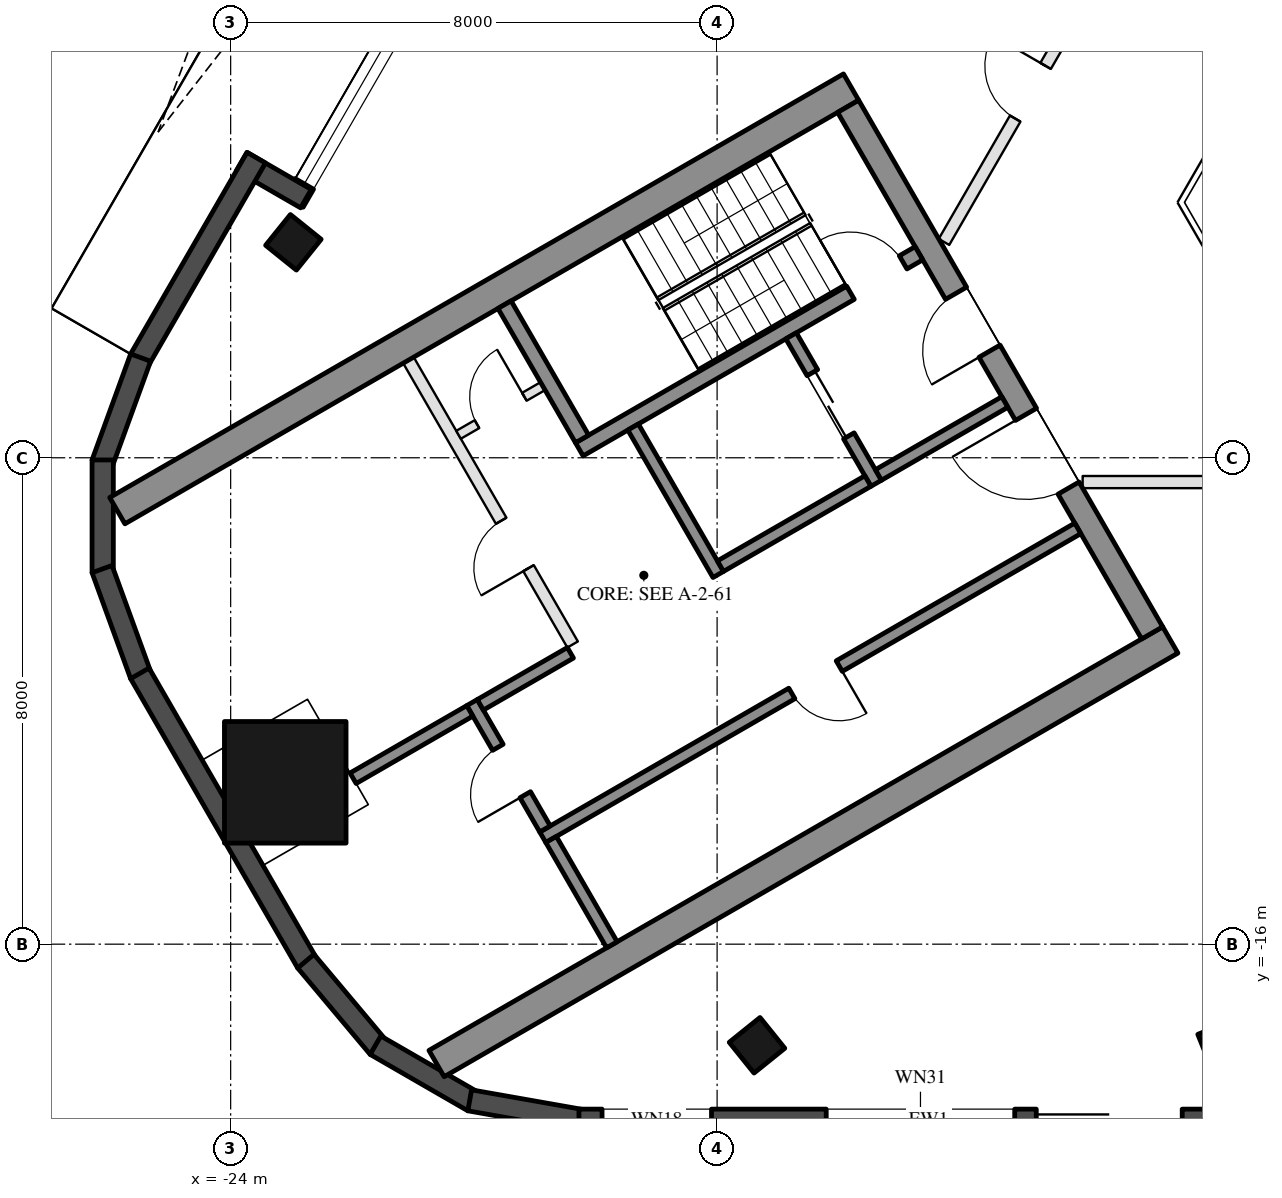
"""IFC4 building model, lengths in metres.
Left out: names, types, materials, properties, quantities, classifications, styles, units other than length and angle.
Written with IfcOpenShell. Run it as: python <this file> out.ifc"""

import sys

from ifc_helpers import new_model, si_unit, direction, frame, frame_2d, origin, origin_2d, place, context, subcontext, project, spatial, rectangle, hollow_rectangle, extrude, boolean, halfspace, element, fill, save


model = new_model("IFC4")
c1 = context("Model", 3, precision=1e-05, world=origin(), true_north=direction((0.0, 1.0)))
c2 = subcontext(c1, "Body", "Model", "MODEL_VIEW")
j1 = project(units=[si_unit("LENGTHUNIT", "METRE"), si_unit("PLANEANGLEUNIT", "RADIAN")], contexts=[c1])
p1 = place(None, origin())
s1 = spatial("IfcSite", under=j1, at=p1, CompositionType="ELEMENT")
p2 = place(p1, origin())
s2 = spatial("IfcBuilding", under=s1, at=p2, CompositionType="ELEMENT")
p3 = place(p2, frame((0.0, 0.0, 265.2)))
s3 = spatial("IfcBuildingStorey", under=s2, at=p3, CompositionType="ELEMENT", Elevation=265.2)
p4 = place(p3, frame((-15.344, -17.663, 0.0), z_axis=(0.121006106938, 0.150399778714, 0.981191840899), x_axis=(-0.992606962496, 0.008942251163, 0.121043191254)))
e1 = element("IfcColumn", 1, at=p4, inside=s3, PredefinedType="COLUMN", context=c2, shape_type="SweptSolid", body=[
    boolean("DIFFERENCE", boolean("DIFFERENCE", extrude(hollow_rectangle(XDim=0.65, YDim=0.65, WallThickness=0.03, at=origin_2d()), origin(), (0.0, 0.0, 1.0), 3.771), halfspace(frame((0.0, 0.0, 0.047), z_axis=(0.0, 0.0, 1.0), x_axis=(1.0, 0.0, 0.0)), True)), halfspace(frame((0.0, 0.0, 3.724), z_axis=(0.0, 0.0, 1.0), x_axis=(1.0, 0.0, 0.0)), False)),
])
p5 = place(p3, frame((-22.968, -4.457, 0.0), z_axis=(0.190735471498, 0.029652697198, 0.981193506634), x_axis=(-0.488320350716, -0.86422901804, 0.121043130549)))
e2 = element("IfcColumn", 2, at=p5, inside=s3, PredefinedType="COLUMN", context=c2, shape_type="SweptSolid", body=[
    boolean("DIFFERENCE", boolean("DIFFERENCE", extrude(hollow_rectangle(XDim=0.65, YDim=0.65, WallThickness=0.03, at=origin_2d()), origin(), (0.0, 0.0, 1.0), 3.771), halfspace(frame((0.0, 0.0, 0.047), z_axis=(0.0, 0.0, 1.0), x_axis=(1.0, 0.0, 0.0)), True)), halfspace(frame((0.0, 0.0, 3.724), z_axis=(0.0, 0.0, 1.0), x_axis=(1.0, 0.0, 0.0)), False)),
])
p6 = place(p3, frame((-23.102, -13.338, 0.0), z_axis=(0.190346159062, 0.109881938965, 0.975548204457), x_axis=(-0.499994868029, 0.866028366632, 1.1507946e-05)))
e3 = element("IfcColumn", 3, at=p6, inside=s3, PredefinedType="COLUMN", context=c2, shape_type="SweptSolid", body=[
    boolean("DIFFERENCE", boolean("DIFFERENCE", extrude(hollow_rectangle(XDim=2.0, YDim=2.0, WallThickness=0.05, at=origin_2d()), origin(), (0.0, 0.0, 1.0), 3.793), halfspace(frame((0.0, 0.0, 0.113), z_axis=(0.0, 0.0, 1.0), x_axis=(1.0, 0.0, 0.0)), True)), halfspace(frame((0.0, 0.0, 3.679), z_axis=(0.0, 0.0, 1.0), x_axis=(1.0, 0.0, 0.0)), False)),
])
p7 = place(p3, frame((-19.704, 1.848, 0.0), z_axis=(0.0, 0.0, 1.0), x_axis=(-0.499993986225, -0.866028875811, 0.0)))
e4 = element("IfcWall", 4, at=p7, inside=s3, PredefinedType="SOLIDWALL", context=c2, shape_type="SweptSolid", body=[
    extrude(rectangle(XDim=6.512, YDim=0.35, at=frame_2d((3.256, 0.0))), origin(), (0.0, 0.0, 1.0), 3.55),
])
p8 = place(p7, frame((0.77, 0.0, 0.0)))
e5 = element("IfcOpeningElement", 5, at=p8, cuts=e4, PredefinedType="OPENING", context=c2, shape_type="SweptSolid", body=[
    extrude(rectangle(XDim=2.4, YDim=2.4, at=frame_2d((1.2, 1.2))), frame((0.0, 0.185, 0.0), z_axis=(0.0, -1.0, 0.0), x_axis=(1.0, 0.0, 0.0)), (0.0, 0.0, 1.0), 0.37),
])
p9 = place(p7, frame((3.47, 0.0, 0.3)))
e6 = element("IfcOpeningElement", 6, at=p9, cuts=e4, PredefinedType="OPENING", context=c2, shape_type="SweptSolid", body=[
    extrude(rectangle(XDim=2.7, YDim=2.65, at=frame_2d((1.35, 1.325))), frame((0.0, 0.185, 0.0), z_axis=(0.0, -1.0, 0.0), x_axis=(1.0, 0.0, 0.0)), (0.0, 0.0, 1.0), 0.37),
])
p10 = place(p3, frame((-22.762, -3.739, 0.0), z_axis=(0.0, 0.0, 1.0), x_axis=(-0.866042269935, 0.499970785833, 0.0)))
e7 = element("IfcWall", 7, at=p10, inside=s3, PredefinedType="SOLIDWALL", context=c2, shape_type="SweptSolid", body=[
    extrude(rectangle(XDim=1.22, YDim=0.35, at=frame_2d((0.61, 0.0))), origin(), (0.0, 0.0, 1.0), 3.55),
])
p11 = place(p3, frame((-23.579, -3.065, 0.0), z_axis=(0.0, 0.0, 1.0), x_axis=(-0.500048109927, -0.865997625723, 0.0)))
e8 = element("IfcWall", 8, at=p11, inside=s3, PredefinedType="SOLIDWALL", context=c2, shape_type="SweptSolid", body=[
    extrude(rectangle(XDim=3.829, YDim=0.35, at=frame_2d((1.914, 0.0))), origin(), (0.0, 0.0, 1.0), 3.55),
])
for number, where, z_axis, x_axis in (
    (9, (-25.481, -6.353, 0.0), (0.0, 0.0, 1.0), (-0.342, -0.94, 0.0)),
    (10, (-26.104, -8.036, 0.0), (0.0, 0.0, 1.0), (0.0, -1.0, 0.0)),
):
    element("IfcWall", number, at=place(p3, frame(where, z_axis=z_axis, x_axis=x_axis)), inside=s3, PredefinedType="SOLIDWALL", context=c2, shape_type="SweptSolid", body=[
        extrude(rectangle(XDim=1.855, YDim=0.35, at=frame_2d((0.927, 0.0))), origin(), (0.0, 0.0, 1.0), 3.55),
    ])
p12 = place(p3, frame((-26.115, -9.831, 0.0), z_axis=(0.0, 0.0, 1.0), x_axis=(0.341890986265, -0.93973962006, 0.0)))
e11 = element("IfcWall", 11, at=p12, inside=s3, PredefinedType="SOLIDWALL", context=c2, shape_type="SweptSolid", body=[
    extrude(rectangle(XDim=1.855, YDim=0.35, at=frame_2d((0.928, 0.0))), origin(), (0.0, 0.0, 1.0), 3.55),
])
p13 = place(p3, frame((-25.494, -11.546, 0.0), z_axis=(0.0, 0.0, 1.0), x_axis=(0.500028854569, -0.86600874395, 0.0)))
e12 = element("IfcWall", 12, at=p13, inside=s3, PredefinedType="SOLIDWALL", context=c2, shape_type="SweptSolid", body=[
    extrude(rectangle(XDim=5.495, YDim=0.35, at=frame_2d((2.748, 0.0))), origin(), (0.0, 0.0, 1.0), 3.55),
])
for number, where, z_axis, x_axis in (
    (13, (-22.764, -16.28, 0.0), (0.0, 0.0, 1.0), (0.643, -0.766, 0.0)),
    (14, (-21.618, -17.662, 0.0), (0.0, 0.0, 1.0), (0.866, -0.5, 0.0)),
):
    element("IfcWall", number, at=place(p3, frame(where, z_axis=z_axis, x_axis=x_axis)), inside=s3, PredefinedType="SOLIDWALL", context=c2, shape_type="SweptSolid", body=[
        extrude(rectangle(XDim=1.855, YDim=0.35, at=frame_2d((0.927, 0.0))), origin(), (0.0, 0.0, 1.0), 3.55),
    ])
p14 = place(p3, frame((-20.069, -18.568, 0.0), z_axis=(0.0, 0.0, 1.0), x_axis=(0.984791508075, -0.173740282098, 0.0)))
e15 = element("IfcWall", 15, at=p14, inside=s3, PredefinedType="SOLIDWALL", context=c2, shape_type="SweptSolid", body=[
    extrude(rectangle(XDim=1.855, YDim=0.35, at=frame_2d((0.927, 0.0))), origin(), (0.0, 0.0, 1.0), 3.55),
])
p15 = place(p3, frame((-18.272, -18.888, 0.0), z_axis=(0.0, 0.0, 1.0), x_axis=(1.0, 0.0, 0.0)))
e16 = element("IfcWall", 16, at=p15, inside=s3, PredefinedType="SOLIDWALL", context=c2, shape_type="SweptSolid", body=[
    extrude(rectangle(XDim=11.5, YDim=0.35, at=frame_2d((5.75, 0.0))), origin(), (0.0, 0.0, 1.0), 3.55),
])
p16 = place(p15, frame((0.38, 0.0, 0.3)))
e17 = element("IfcOpeningElement", 17, at=p16, cuts=e16, PredefinedType="OPENING", context=c2, shape_type="SweptSolid", body=[
    extrude(rectangle(XDim=1.8, YDim=2.65, at=frame_2d((0.9, 1.325))), frame((0.0, 0.185, 0.0), z_axis=(0.0, -1.0, 0.0), x_axis=(1.0, 0.0, 0.0)), (0.0, 0.0, 1.0), 0.37),
])
p17 = place(p15, frame((7.521, 0.0, 0.0)))
e18 = element("IfcOpeningElement", 18, at=p17, cuts=e16, PredefinedType="OPENING", context=c2, shape_type="SweptSolid", body=[
    extrude(rectangle(XDim=2.4, YDim=2.4, at=frame_2d((1.2, 1.2))), frame((0.0, 0.185, 0.0), z_axis=(0.0, -1.0, 0.0), x_axis=(1.0, 0.0, 0.0)), (0.0, 0.0, 1.0), 0.37),
])
p18 = place(p15, frame((4.067, 0.0, 0.3)))
e19 = element("IfcOpeningElement", 19, at=p18, cuts=e16, PredefinedType="OPENING", context=c2, shape_type="SweptSolid", body=[
    extrude(rectangle(XDim=3.1, YDim=2.65, at=frame_2d((1.55, 1.325))), frame((0.0, 0.185, 0.0), z_axis=(0.0, -1.0, 0.0), x_axis=(1.0, 0.0, 0.0)), (0.0, 0.0, 1.0), 0.37),
])
for number, where, z_axis, x_axis in (
    (20, (-13.797, -1.903, 0.0), (0.0, 0.0, 1.0), (-0.866, -0.5, 0.0)),
    (21, (-8.547, -10.997, 0.0), (0.0, 0.0, 1.0), (-0.866, -0.5, 0.0)),
):
    element("IfcWall", number, at=place(p3, frame(where, z_axis=z_axis, x_axis=x_axis)), inside=s3, PredefinedType="SHEAR", context=c2, shape_type="SweptSolid", body=[
        extrude(rectangle(XDim=13.934, YDim=0.5, at=frame_2d((6.967, 0.0))), origin(), (0.0, 0.0, 1.0), 3.5),
    ])
p19 = place(p3, frame((-13.845, -2.22, 0.0), z_axis=(0.0, 0.0, 1.0), x_axis=(0.500004234368, -0.866022959057, 0.0)))
e22 = element("IfcWall", 22, at=p19, inside=s3, PredefinedType="SHEAR", context=c2, shape_type="SweptSolid", body=[
    extrude(rectangle(XDim=10.0, YDim=0.4, at=frame_2d((5.0, 0.0))), origin(), (0.0, 0.0, 1.0), 3.5),
])
p20 = place(p19, frame((3.55, 0.0, 0.0)))
e23 = element("IfcOpeningElement", 23, at=p20, cuts=e22, PredefinedType="OPENING", context=c2, shape_type="SweptSolid", body=[
    extrude(rectangle(XDim=1.1, YDim=2.1, at=frame_2d((0.55, 1.05))), frame((0.0, 0.21, 0.0), z_axis=(0.0, -1.0, 0.0), x_axis=(1.0, 0.0, 0.0)), (0.0, 0.0, 1.0), 0.42),
])
p21 = place(p19, frame((5.85, 0.0, 0.0)))
e24 = element("IfcOpeningElement", 24, at=p21, cuts=e22, PredefinedType="OPENING", context=c2, shape_type="SweptSolid", body=[
    extrude(rectangle(XDim=1.4, YDim=2.1, at=frame_2d((0.7, 1.05))), frame((0.0, 0.21, 0.0), z_axis=(0.0, -1.0, 0.0), x_axis=(1.0, 0.0, 0.0)), (0.0, 0.0, 1.0), 0.42),
])
p22 = place(p3, frame((-12.681, -4.636, 0.0), z_axis=(0.0, 0.0, 1.0), x_axis=(-0.866021702275, -0.500006411147, 0.0)))
e25 = element("IfcWall", 25, at=p22, inside=s3, PredefinedType="SHEAR", context=c2, shape_type="SweptSolid", body=[
    extrude(rectangle(XDim=6.45, YDim=0.25, at=frame_2d((3.225, 0.0))), origin(), (0.0, 0.0, 1.0), 3.5),
])
p23 = place(p22, frame((0.3, 0.0, 0.0)))
e26 = element("IfcOpeningElement", 26, at=p23, cuts=e25, PredefinedType="OPENING", context=c2, shape_type="SweptSolid", body=[
    extrude(rectangle(XDim=1.0, YDim=2.1, at=frame_2d((0.5, 1.05))), frame((0.0, 0.135, 0.0), z_axis=(0.0, -1.0, 0.0), x_axis=(1.0, 0.0, 0.0)), (0.0, 0.0, 1.0), 0.27),
])
p24 = place(p3, frame((-19.496, -5.482, 0.0), z_axis=(0.0, 0.0, 1.0), x_axis=(0.499990435942, -0.866030925526, 0.0)))
e27 = element("IfcWall", 27, at=p24, inside=s3, PredefinedType="SHEAR", context=c2, shape_type="SweptSolid", body=[
    extrude(rectangle(XDim=2.55, YDim=0.25, at=frame_2d((1.275, 0.0))), origin(), (0.0, 0.0, 1.0), 3.5),
])
p25 = place(p3, frame((-17.381, -7.495, 0.0), z_axis=(0.0, 0.0, 1.0), x_axis=(0.500011755427, -0.866018616679, 0.0)))
e28 = element("IfcWall", 28, at=p25, inside=s3, PredefinedType="SHEAR", context=c2, shape_type="SweptSolid", body=[
    extrude(rectangle(XDim=2.8, YDim=0.2, at=frame_2d((1.4, 0.0))), origin(), (0.0, 0.0, 1.0), 3.5),
])
p26 = place(p3, frame((-14.783, -5.995, 0.0), z_axis=(0.0, 0.0, 1.0), x_axis=(0.49994636267, -0.866056369097, 0.0)))
e29 = element("IfcWall", 29, at=p26, inside=s3, PredefinedType="SHEAR", context=c2, shape_type="SweptSolid", body=[
    extrude(rectangle(XDim=2.8, YDim=0.2, at=frame_2d((1.4, 0.0))), origin(), (0.0, 0.0, 1.0), 3.5),
])
p27 = place(p26, frame((0.7, 0.0, 0.0)))
e30 = element("IfcOpeningElement", 30, at=p27, cuts=e29, PredefinedType="OPENING", context=c2, shape_type="SweptSolid", body=[
    extrude(rectangle(XDim=1.2, YDim=2.1, at=frame_2d((0.6, 1.05))), frame((0.0, 0.11, 0.0), z_axis=(0.0, -1.0, 0.0), x_axis=(1.0, 0.0, 0.0)), (0.0, 0.0, 1.0), 0.22),
])
p28 = place(p3, frame((-13.52, -8.383, 0.0), z_axis=(0.0, 0.0, 1.0), x_axis=(-0.866034573852, -0.49998411664, 0.0)))
e31 = element("IfcWall", 31, at=p28, inside=s3, PredefinedType="SHEAR", context=c2, shape_type="SweptSolid", body=[
    extrude(rectangle(XDim=2.8, YDim=0.2, at=frame_2d((1.4, 0.0))), origin(), (0.0, 0.0, 1.0), 3.5),
])
p29 = place(p3, frame((-11.268, -7.083, 0.0), z_axis=(0.0, 0.0, 1.0), x_axis=(-0.866050077142, -0.499957262057, 0.0)))
e32 = element("IfcWall", 32, at=p29, inside=s3, PredefinedType="SHEAR", context=c2, shape_type="SweptSolid", body=[
    extrude(rectangle(XDim=2.4, YDim=0.2, at=frame_2d((1.2, 0.0))), origin(), (0.0, 0.0, 1.0), 3.5),
])
p30 = place(p3, frame((-10.068, -9.162, 0.0), z_axis=(0.0, 0.0, 1.0), x_axis=(-0.866032725843, -0.499987317609, 0.0)))
e33 = element("IfcWall", 33, at=p30, inside=s3, PredefinedType="SHEAR", context=c2, shape_type="SweptSolid", body=[
    extrude(rectangle(XDim=10.16, YDim=0.2, at=frame_2d((5.08, 0.0))), origin(), (0.0, 0.0, 1.0), 3.5),
])
p31 = place(p30, frame((4.53, 0.0, 0.0)))
e34 = element("IfcOpeningElement", 34, at=p31, cuts=e33, PredefinedType="OPENING", context=c2, shape_type="SweptSolid", body=[
    extrude(rectangle(XDim=0.9, YDim=2.1, at=frame_2d((0.45, 1.05))), frame((0.0, 0.11, 0.0), z_axis=(0.0, -1.0, 0.0), x_axis=(1.0, 0.0, 0.0)), (0.0, 0.0, 1.0), 0.22),
])
p32 = place(p3, frame((-20.031, -12.026, 0.0), z_axis=(0.0, 0.0, 1.0), x_axis=(0.500033551112, -0.866006032174, 0.0)))
e35 = element("IfcWall", 35, at=p32, inside=s3, PredefinedType="SHEAR", context=c2, shape_type="SweptSolid", body=[
    extrude(rectangle(XDim=2.4, YDim=0.2, at=frame_2d((1.2, 0.0))), origin(), (0.0, 0.0, 1.0), 3.5),
])
p33 = place(p32, frame((0.85, 0.0, 0.0)))
e36 = element("IfcOpeningElement", 36, at=p33, cuts=e35, PredefinedType="OPENING", context=c2, shape_type="SweptSolid", body=[
    extrude(rectangle(XDim=0.9, YDim=2.1, at=frame_2d((0.45, 1.05))), frame((0.0, 0.11, 0.0), z_axis=(0.0, -1.0, 0.0), x_axis=(1.0, 0.0, 0.0)), (0.0, 0.0, 1.0), 0.22),
])
p34 = place(p3, frame((-18.413, -11.208, 0.0), z_axis=(0.0, 0.0, 1.0), x_axis=(-0.866038183914, -0.499977863513, 0.0)))
e37 = element("IfcWall", 37, at=p34, inside=s3, PredefinedType="SHEAR", context=c2, shape_type="SweptSolid", body=[
    extrude(rectangle(XDim=1.71, YDim=0.2, at=frame_2d((0.855, 0.0))), origin(), (0.0, 0.0, 1.0), 3.5),
])
p35 = place(p3, frame((-18.73, -14.278, 0.0), z_axis=(0.0, 0.0, 1.0), x_axis=(0.50002537861, -0.866010750942, 0.0)))
e38 = element("IfcWall", 38, at=p35, inside=s3, PredefinedType="SHEAR", context=c2, shape_type="SweptSolid", body=[
    extrude(rectangle(XDim=2.0, YDim=0.2, at=frame_2d((1.0, 0.0))), origin(), (0.0, 0.0, 1.0), 3.5),
])
p36 = place(p3, frame((-20.067, -12.163, 0.0), z_axis=(0.0, 0.0, 1.0), x_axis=(-0.866079196458, -0.49990681678, 0.0)))
e39 = element("IfcWall", 39, at=p36, inside=s3, PredefinedType="SHEAR", context=c2, shape_type="SweptSolid", body=[
    extrude(rectangle(XDim=2.216, YDim=0.2, at=frame_2d((1.108, 0.0))), origin(), (0.0, 0.0, 1.0), 3.5),
])
p37 = place(p3, frame((-21.076, -6.395, 0.0), z_axis=(0.0, 0.0, 1.0), x_axis=(0.50001468107, -0.866016927499, 0.0)))
e40 = element("IfcWall", 40, at=p37, inside=s3, PredefinedType="PARTITIONING", context=c2, shape_type="SweptSolid", body=[
    extrude(rectangle(XDim=5.4, YDim=0.2, at=frame_2d((2.7, 0.0))), origin(), (0.0, 0.0, 1.0), 3.5),
])
p38 = place(p37, frame((3.05, 0.0, 0.0)))
e41 = element("IfcOpeningElement", 41, at=p38, cuts=e40, PredefinedType="OPENING", context=c2, shape_type="SweptSolid", body=[
    extrude(rectangle(XDim=0.9, YDim=2.1, at=frame_2d((0.45, 1.05))), frame((0.0, 0.11, 0.0), z_axis=(0.0, -1.0, 0.0), x_axis=(1.0, 0.0, 0.0)), (0.0, 0.0, 1.0), 0.22),
])
p39 = place(p3, frame((-18.866, -6.822, 0.0), z_axis=(0.0, 0.0, 1.0), x_axis=(-0.866028054938, -0.499995408039, 0.0)))
e42 = element("IfcWall", 42, at=p39, inside=s3, PredefinedType="PARTITIONING", context=c2, shape_type="SweptSolid", body=[
    extrude(rectangle(XDim=1.6, YDim=0.15, at=frame_2d((0.8, 0.0))), origin(), (0.0, 0.0, 1.0), 3.5),
])
p40 = place(p39, frame((0.35, 0.0, 0.0)))
e43 = element("IfcOpeningElement", 43, at=p40, cuts=e42, PredefinedType="OPENING", context=c2, shape_type="SweptSolid", body=[
    extrude(rectangle(XDim=0.9, YDim=2.1, at=frame_2d((0.45, 1.05))), frame((0.0, 0.085, 0.0), z_axis=(0.0, -1.0, 0.0), x_axis=(1.0, 0.0, 0.0)), (0.0, 0.0, 1.0), 0.17),
])
p41 = place(p3, frame((-4.708, -8.4, 0.0), z_axis=(0.0, 0.0, 1.0), x_axis=(-1.0, 0.0, 0.0)))
e44 = element("IfcWall", 44, at=p41, inside=s3, PredefinedType="PARTITIONING", context=c2, shape_type="SweptSolid", body=[
    extrude(rectangle(XDim=5.281, YDim=0.2, at=frame_2d((2.64, 0.0))), origin(), (0.0, 0.0, 1.0), 3.0),
])
p42 = place(p41, frame((2.14, 0.0, 0.0)))
e45 = element("IfcOpeningElement", 45, at=p42, cuts=e44, PredefinedType="OPENING", context=c2, shape_type="SweptSolid", body=[
    extrude(rectangle(XDim=1.0, YDim=2.1, at=frame_2d((0.5, 1.05))), frame((0.0, 0.11, 0.0), z_axis=(0.0, -1.0, 0.0), x_axis=(1.0, 0.0, 0.0)), (0.0, 0.0, 1.0), 0.22),
])
p43 = place(p3, frame((-12.269, -4.45, 0.0), z_axis=(0.0, 0.0, 1.0), x_axis=(0.500009958894, 0.866019653938, 0.0)))
e46 = element("IfcWall", 46, at=p43, inside=s3, PredefinedType="PARTITIONING", context=c2, shape_type="SweptSolid", body=[
    extrude(rectangle(XDim=5.685, YDim=0.2, at=frame_2d((2.842, 0.0))), origin(), (0.0, 0.0, 1.0), 3.0),
])
p44 = place(p43, frame((2.342, 0.0, 0.0)))
e47 = element("IfcOpeningElement", 47, at=p44, cuts=e46, PredefinedType="OPENING", context=c2, shape_type="SweptSolid", body=[
    extrude(rectangle(XDim=1.0, YDim=2.1, at=frame_2d((0.5, 1.05))), frame((0.0, 0.11, 0.0), z_axis=(0.0, -1.0, 0.0), x_axis=(1.0, 0.0, 0.0)), (0.0, 0.0, 1.0), 0.22),
])
p45 = place(p9, origin())
e48 = element("IfcWindow", 48, at=p45, inside=s3, PartitioningType="SINGLE_PANEL", PredefinedType="WINDOW", context=c2, shape_type="SweptSolid", body=[
    extrude(rectangle(XDim=2.7, YDim=2.65, at=frame_2d((1.35, 1.325))), frame((0.0, 0.03, 0.0), z_axis=(0.0, -1.0, 0.0), x_axis=(1.0, 0.0, 0.0)), (0.0, 0.0, 1.0), 0.06),
])
fill(e6, e48)
p46 = place(p27, origin())
e49 = element("IfcDoor", 49, at=p46, inside=s3, OperationType="DOUBLE_DOOR_SLIDING", PredefinedType="DOOR", context=c2, shape_type="SweptSolid", body=[
    extrude(rectangle(XDim=1.2, YDim=2.1, at=frame_2d((0.6, 1.05))), frame((0.0, 0.025, 0.0), z_axis=(0.0, -1.0, 0.0), x_axis=(1.0, 0.0, 0.0)), (0.0, 0.0, 1.0), 0.05),
])
fill(e30, e49)
p47 = place(p40, frame((0.9, 0.0, 0.0), z_axis=(0.0, 0.0, 1.0), x_axis=(-1.0, 0.0, 0.0)))
e50 = element("IfcDoor", 50, at=p47, inside=s3, OperationType="SINGLE_SWING_RIGHT", PredefinedType="DOOR", context=c2, shape_type="SweptSolid", body=[
    extrude(rectangle(XDim=0.9, YDim=2.1, at=frame_2d((0.45, 1.05))), frame((0.0, 0.025, 0.0), z_axis=(0.0, -1.0, 0.0), x_axis=(1.0, 0.0, 0.0)), (0.0, 0.0, 1.0), 0.05),
])
fill(e43, e50)
p48 = place(p31, origin())
e51 = element("IfcDoor", 51, at=p48, inside=s3, OperationType="SINGLE_SWING_LEFT", PredefinedType="DOOR", context=c2, shape_type="SweptSolid", body=[
    extrude(rectangle(XDim=0.9, YDim=2.1, at=frame_2d((0.45, 1.05))), frame((0.0, 0.025, 0.0), z_axis=(0.0, -1.0, 0.0), x_axis=(1.0, 0.0, 0.0)), (0.0, 0.0, 1.0), 0.05),
])
fill(e34, e51)
p49 = place(p33, frame((0.9, 0.0, 0.0), z_axis=(0.0, 0.0, 1.0), x_axis=(-1.0, 0.0, 0.0)))
e52 = element("IfcDoor", 52, at=p49, inside=s3, OperationType="SINGLE_SWING_LEFT", PredefinedType="DOOR", context=c2, shape_type="SweptSolid", body=[
    extrude(rectangle(XDim=0.9, YDim=2.1, at=frame_2d((0.45, 1.05))), frame((0.0, 0.025, 0.0), z_axis=(0.0, -1.0, 0.0), x_axis=(1.0, 0.0, 0.0)), (0.0, 0.0, 1.0), 0.05),
])
fill(e36, e52)
p50 = place(p38, frame((0.9, 0.0, 0.0), z_axis=(0.0, 0.0, 1.0), x_axis=(-1.0, 0.0, 0.0)))
e53 = element("IfcDoor", 53, at=p50, inside=s3, OperationType="SINGLE_SWING_LEFT", PredefinedType="DOOR", context=c2, shape_type="SweptSolid", body=[
    extrude(rectangle(XDim=0.9, YDim=2.1, at=frame_2d((0.45, 1.05))), frame((0.0, 0.025, 0.0), z_axis=(0.0, -1.0, 0.0), x_axis=(1.0, 0.0, 0.0)), (0.0, 0.0, 1.0), 0.05),
])
fill(e41, e53)
p51 = place(p20, frame((1.1, 0.0, 0.0), z_axis=(0.0, 0.0, 1.0), x_axis=(-1.0, 0.0, 0.0)))
e54 = element("IfcDoor", 54, at=p51, inside=s3, OperationType="SINGLE_SWING_LEFT", PredefinedType="DOOR", context=c2, shape_type="SweptSolid", body=[
    extrude(rectangle(XDim=1.1, YDim=2.1, at=frame_2d((0.55, 1.05))), frame((0.0, 0.025, 0.0), z_axis=(0.0, -1.0, 0.0), x_axis=(1.0, 0.0, 0.0)), (0.0, 0.0, 1.0), 0.05),
])
fill(e23, e54)
p52 = place(p21, frame((1.4, 0.0, 0.0), z_axis=(0.0, 0.0, 1.0), x_axis=(-1.0, 0.0, 0.0)))
e55 = element("IfcDoor", 55, at=p52, inside=s3, OperationType="DOUBLE_DOOR_SINGLE_SWING", PredefinedType="DOOR", context=c2, shape_type="SweptSolid", body=[
    extrude(rectangle(XDim=1.4, YDim=2.1, at=frame_2d((0.7, 1.05))), frame((0.0, 0.025, 0.0), z_axis=(0.0, -1.0, 0.0), x_axis=(1.0, 0.0, 0.0)), (0.0, 0.0, 1.0), 0.05),
])
fill(e24, e55)
p53 = place(p23, frame((1.0, 0.0, 0.0), z_axis=(0.0, 0.0, 1.0), x_axis=(-1.0, 0.0, 0.0)))
e56 = element("IfcDoor", 56, at=p53, inside=s3, OperationType="SINGLE_SWING_LEFT", PredefinedType="DOOR", context=c2, shape_type="SweptSolid", body=[
    extrude(rectangle(XDim=1.0, YDim=2.1, at=frame_2d((0.5, 1.05))), frame((0.0, 0.025, 0.0), z_axis=(0.0, -1.0, 0.0), x_axis=(1.0, 0.0, 0.0)), (0.0, 0.0, 1.0), 0.05),
])
fill(e26, e56)
p54 = place(p44, origin())
e57 = element("IfcDoor", 57, at=p54, inside=s3, OperationType="SINGLE_SWING_RIGHT", PredefinedType="DOOR", context=c2, shape_type="SweptSolid", body=[
    extrude(rectangle(XDim=1.0, YDim=2.1, at=frame_2d((0.5, 1.05))), frame((0.0, 0.025, 0.0), z_axis=(0.0, -1.0, 0.0), x_axis=(1.0, 0.0, 0.0)), (0.0, 0.0, 1.0), 0.05),
])
fill(e47, e57)
save(model, sys.argv[1])
